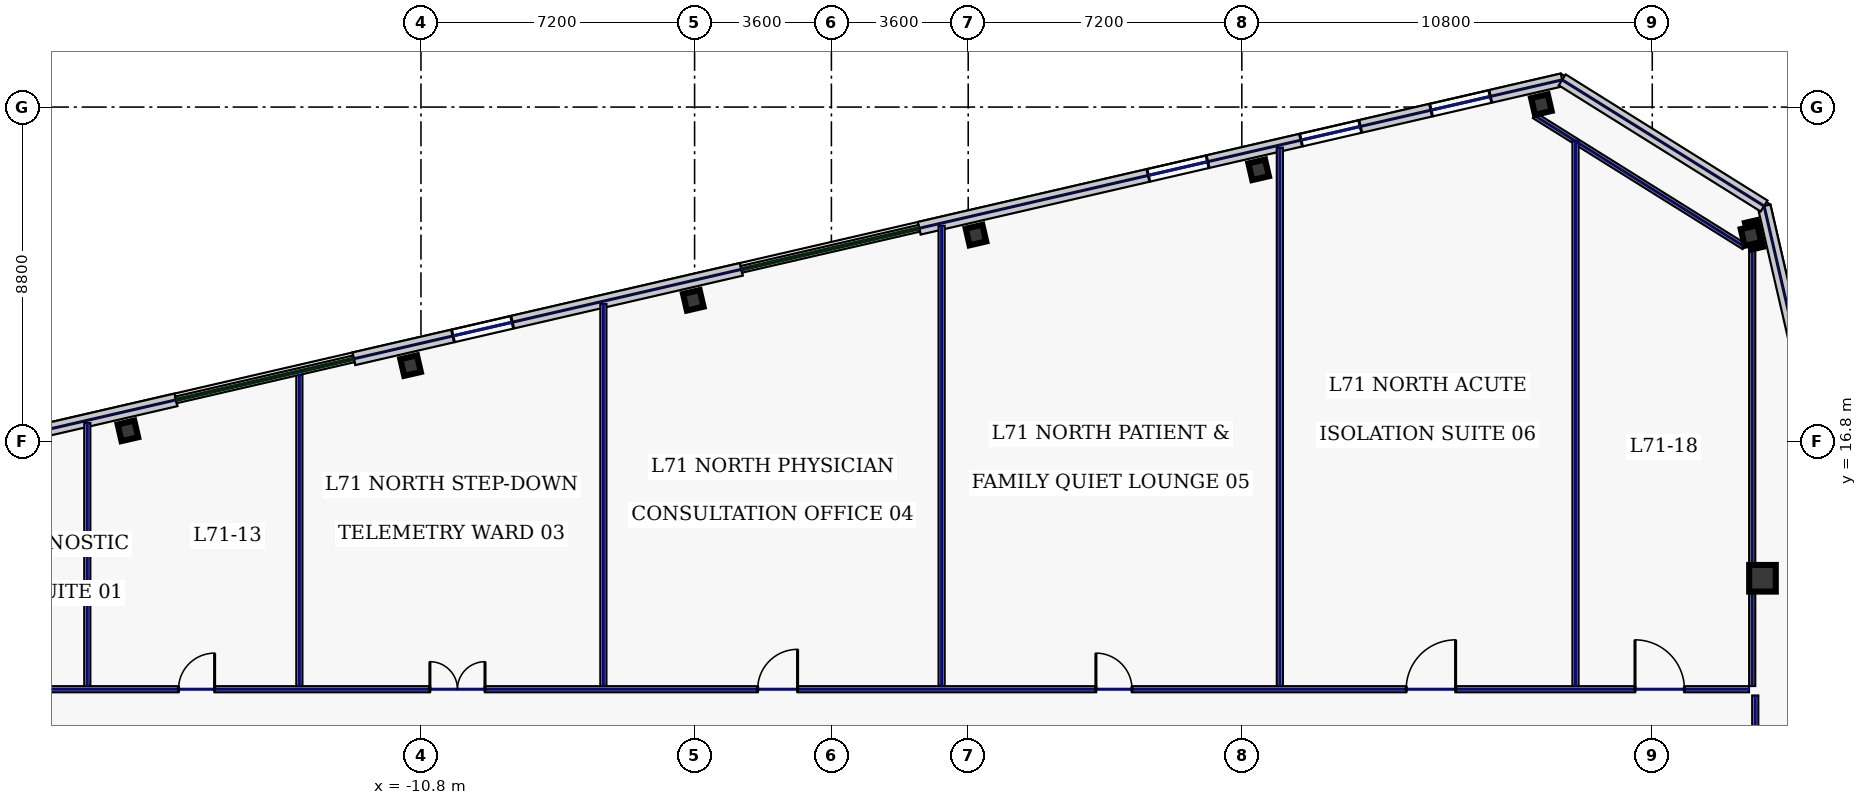
"""IFC4 building model, lengths in metres.
Left out: names, types, materials, properties, quantities, classifications, styles, units other than length and angle.
Written with IfcOpenShell. Run it as: python <this file> out.ifc"""

import sys

from ifc_helpers import new_model, si_unit, direction, frame, frame_2d, origin, origin_2d, place, context, subcontext, project, spatial, rectangle, hollow_rectangle, extrude, element, fill, save


model = new_model("IFC4")
c1 = context("Model", 3, precision=1e-05, world=origin(), true_north=direction((0.0, 1.0)))
c2 = subcontext(c1, "Body", "Model", "MODEL_VIEW")
j1 = project(units=[si_unit("LENGTHUNIT", "METRE"), si_unit("PLANEANGLEUNIT", "RADIAN")], contexts=[c1])
p1 = place(None, origin())
s1 = spatial("IfcSite", under=j1, at=p1, CompositionType="ELEMENT")
p2 = place(p1, origin())
s2 = spatial("IfcBuilding", under=s1, at=p2, CompositionType="ELEMENT")
p3 = place(p2, frame((0.0, 0.0, 305.0)))
s3 = spatial("IfcBuildingStorey", under=s2, at=p3, CompositionType="ELEMENT", Elevation=305.0)
p4 = place(p3, frame((24.5, 13.2, 0.0), z_axis=(0.0, 0.0, 1.0), x_axis=(1.0, 0.0, 0.0)))
e1 = element("IfcColumn", 1, at=p4, inside=s3, PredefinedType="COLUMN", context=c2, shape_type="SweptSolid", body=[
    extrude(hollow_rectangle(XDim=0.7, YDim=0.7, WallThickness=0.032, at=origin_2d()), origin(), (0.0, 0.0, 1.0), 3.74),
])
for number, where, z_axis, x_axis in (
    (2, (18.682, 25.666, 0.0), (0.0, 0.0, 1.0), (0.974, 0.225, 0.0)),
    (3, (11.243, 23.949, 0.0), (0.0, 0.0, 1.0), (0.974, 0.225, 0.0)),
    (4, (3.804, 22.232, 0.0), (0.0, 0.0, 1.0), (0.974, 0.225, 0.0)),
    (5, (-3.634, 20.514, 0.0), (0.0, 0.0, 1.0), (0.974, 0.225, 0.0)),
    (6, (-11.073, 18.797, 0.0), (0.0, 0.0, 1.0), (0.974, 0.225, 0.0)),
    (7, (-18.511, 17.08, 0.0), (0.0, 0.0, 1.0), (0.974, 0.225, 0.0)),
    (8, (24.198, 22.219, 0.0), (0.0, 0.0, 1.0), (0.974, 0.225, 0.0)),
):
    element("IfcColumn", number, at=place(p3, frame(where, z_axis=z_axis, x_axis=x_axis)), inside=s3, PredefinedType="COLUMN", context=c2, shape_type="SweptSolid", body=[
        extrude(hollow_rectangle(XDim=0.45, YDim=0.45, WallThickness=0.022, at=origin_2d()), origin(), (0.0, 0.0, 1.0), 3.74),
    ])
p5 = place(p3, frame((19.229, 26.316, 0.0), z_axis=(0.0, 0.0, 1.0), x_axis=(-0.974372473594, -0.224940620392, 0.0)))
e9 = element("IfcWall", 9, at=p5, inside=s3, PredefinedType="STANDARD", context=c2, shape_type="SweptSolid", body=[
    extrude(rectangle(XDim=17.366, YDim=0.34, at=frame_2d((8.683, 0.0))), origin(), (0.0, 0.0, 1.0), 3.74),
])
p6 = place(p5, frame((9.576, 0.0, 0.22)))
e10 = element("IfcOpeningElement", 10, at=p6, cuts=e9, PredefinedType="OPENING", context=c2, shape_type="SweptSolid", body=[
    extrude(rectangle(XDim=1.6, YDim=1.2, at=frame_2d((0.8, 0.6))), frame((0.0, 0.18, 0.0), z_axis=(0.0, -1.0, 0.0), x_axis=(1.0, 0.0, 0.0)), (0.0, 0.0, 1.0), 0.36),
])
p7 = place(p5, frame((5.453, 0.0, 0.22)))
e11 = element("IfcOpeningElement", 11, at=p7, cuts=e9, PredefinedType="OPENING", context=c2, shape_type="SweptSolid", body=[
    extrude(rectangle(XDim=1.6, YDim=1.2, at=frame_2d((0.8, 0.6))), frame((0.0, 0.18, 0.0), z_axis=(0.0, -1.0, 0.0), x_axis=(1.0, 0.0, 0.0)), (0.0, 0.0, 1.0), 0.36),
])
p8 = place(p5, frame((1.941, 0.0, 0.22)))
e12 = element("IfcOpeningElement", 12, at=p8, cuts=e9, PredefinedType="OPENING", context=c2, shape_type="SweptSolid", body=[
    extrude(rectangle(XDim=1.6, YDim=1.2, at=frame_2d((0.8, 0.6))), frame((0.0, 0.18, 0.0), z_axis=(0.0, -1.0, 0.0), x_axis=(1.0, 0.0, 0.0)), (0.0, 0.0, 1.0), 0.36),
])
p9 = place(p3, frame((-2.368, 21.33, 0.0), z_axis=(0.0, 0.0, 1.0), x_axis=(-0.974367213107, -0.224963405961, 0.0)))
e13 = element("IfcWall", 13, at=p9, inside=s3, PredefinedType="STANDARD", context=c2, shape_type="SweptSolid", body=[
    extrude(rectangle(XDim=10.468, YDim=0.34, at=frame_2d((5.234, 0.0))), origin(), (0.0, 0.0, 1.0), 3.74),
])
p10 = place(p9, frame((6.19, 0.0, 0.22)))
e14 = element("IfcOpeningElement", 14, at=p10, cuts=e13, PredefinedType="OPENING", context=c2, shape_type="SweptSolid", body=[
    extrude(rectangle(XDim=1.6, YDim=1.2, at=frame_2d((0.8, 0.6))), frame((0.0, 0.18, 0.0), z_axis=(0.0, -1.0, 0.0), x_axis=(1.0, 0.0, 0.0)), (0.0, 0.0, 1.0), 0.36),
])
p11 = place(p3, frame((-17.245, 17.895, 0.0), z_axis=(0.0, 0.0, 1.0), x_axis=(-0.97437318493, -0.224937539085, 0.0)))
e15 = element("IfcWall", 15, at=p11, inside=s3, PredefinedType="STANDARD", context=c2, shape_type="SweptSolid", body=[
    extrude(rectangle(XDim=17.366, YDim=0.34, at=frame_2d((8.683, 0.0))), origin(), (0.0, 0.0, 1.0), 3.74),
])
p12 = place(p11, frame((13.825, 0.0, 0.22)))
e16 = element("IfcOpeningElement", 16, at=p12, cuts=e15, PredefinedType="OPENING", context=c2, shape_type="SweptSolid", body=[
    extrude(rectangle(XDim=1.6, YDim=1.2, at=frame_2d((0.8, 0.6))), frame((0.0, 0.18, 0.0), z_axis=(0.0, -1.0, 0.0), x_axis=(1.0, 0.0, 0.0)), (0.0, 0.0, 1.0), 0.36),
])
p13 = place(p11, frame((10.313, 0.0, 0.22)))
e17 = element("IfcOpeningElement", 17, at=p13, cuts=e15, PredefinedType="OPENING", context=c2, shape_type="SweptSolid", body=[
    extrude(rectangle(XDim=1.6, YDim=1.2, at=frame_2d((0.8, 0.6))), frame((0.0, 0.18, 0.0), z_axis=(0.0, -1.0, 0.0), x_axis=(1.0, 0.0, 0.0)), (0.0, 0.0, 1.0), 0.36),
])
p14 = place(p3, frame((32.686, -12.276, 0.0), z_axis=(0.0, 0.0, 1.0), x_axis=(-0.224953091034, 0.974369594576, 0.0)))
e18 = element("IfcWall", 18, at=p14, inside=s3, PredefinedType="STANDARD", context=c2, shape_type="SweptSolid", body=[
    extrude(rectangle(XDim=36.2, YDim=0.34, at=frame_2d((18.1, 0.0))), origin(), (0.0, 0.0, 1.0), 3.74),
])
p15 = place(p14, frame((3.725, 0.0, 0.22)))
e19 = element("IfcOpeningElement", 19, at=p15, cuts=e18, PredefinedType="OPENING", context=c2, shape_type="SweptSolid", body=[
    extrude(rectangle(XDim=1.6, YDim=1.2, at=frame_2d((0.8, 0.6))), frame((0.0, 0.18, 0.0), z_axis=(0.0, -1.0, 0.0), x_axis=(1.0, 0.0, 0.0)), (0.0, 0.0, 1.0), 0.36),
])
p16 = place(p14, frame((21.825, 0.0, 0.22)))
e20 = element("IfcOpeningElement", 20, at=p16, cuts=e18, PredefinedType="OPENING", context=c2, shape_type="SweptSolid", body=[
    extrude(rectangle(XDim=1.6, YDim=1.2, at=frame_2d((0.8, 0.6))), frame((0.0, 0.18, 0.0), z_axis=(0.0, -1.0, 0.0), x_axis=(1.0, 0.0, 0.0)), (0.0, 0.0, 1.0), 0.36),
])
p17 = place(p14, frame((30.875, 0.0, 0.22)))
e21 = element("IfcOpeningElement", 21, at=p17, cuts=e18, PredefinedType="OPENING", context=c2, shape_type="SweptSolid", body=[
    extrude(rectangle(XDim=1.6, YDim=1.2, at=frame_2d((0.8, 0.6))), frame((0.0, 0.18, 0.0), z_axis=(0.0, -1.0, 0.0), x_axis=(1.0, 0.0, 0.0)), (0.0, 0.0, 1.0), 0.36),
])
p18 = place(p3, frame((24.542, 22.996, 0.0), z_axis=(0.0, 0.0, 1.0), x_axis=(-0.848055220921, 0.529907862057, 0.0)))
e22 = element("IfcWall", 22, at=p18, inside=s3, PredefinedType="STANDARD", context=c2, shape_type="SweptSolid", body=[
    extrude(rectangle(XDim=6.265, YDim=0.34, at=frame_2d((3.132, 0.0))), origin(), (0.0, 0.0, 1.0), 3.74),
])
p19 = place(p3, frame((24.018, 21.931, 0.0), z_axis=(0.0, 0.0, 1.0), x_axis=(-0.848051009591, 0.529914601736, 0.0)))
e23 = element("IfcWall", 23, at=p19, inside=s3, PredefinedType="PARTITIONING", context=c2, shape_type="SweptSolid", body=[
    extrude(rectangle(XDim=6.505, YDim=0.16, at=frame_2d((3.253, 0.0))), origin(), (0.0, 0.0, 1.0), 1.535),
])
p20 = place(p3, frame((-24.145, 10.28, 0.0), z_axis=(0.0, 0.0, 1.0), x_axis=(1.0, 0.0, 0.0)))
e24 = element("IfcWall", 24, at=p20, inside=s3, PredefinedType="PARTITIONING", context=c2, shape_type="SweptSolid", body=[
    extrude(rectangle(XDim=48.29, YDim=0.16, at=frame_2d((24.145, 0.0))), origin(), (0.0, 0.0, 1.0), 3.74),
])
p21 = place(p20, frame((2.044, 0.0, 0.0)))
e25 = element("IfcOpeningElement", 25, at=p21, cuts=e24, PredefinedType="OPENING", context=c2, shape_type="SweptSolid", body=[
    extrude(rectangle(XDim=0.95, YDim=2.2, at=frame_2d((0.475, 1.1))), frame((0.0, 0.09, 0.0), z_axis=(0.0, -1.0, 0.0), x_axis=(1.0, 0.0, 0.0)), (0.0, 0.0, 1.0), 0.18),
])
p22 = place(p20, frame((6.965, 0.0, 0.0)))
e26 = element("IfcOpeningElement", 26, at=p22, cuts=e24, PredefinedType="OPENING", context=c2, shape_type="SweptSolid", body=[
    extrude(rectangle(XDim=0.95, YDim=2.2, at=frame_2d((0.475, 1.1))), frame((0.0, 0.09, 0.0), z_axis=(0.0, -1.0, 0.0), x_axis=(1.0, 0.0, 0.0)), (0.0, 0.0, 1.0), 0.18),
])
p23 = place(p20, frame((13.58, 0.0, 0.0)))
e27 = element("IfcOpeningElement", 27, at=p23, cuts=e24, PredefinedType="OPENING", context=c2, shape_type="SweptSolid", body=[
    extrude(rectangle(XDim=1.45, YDim=2.2, at=frame_2d((0.725, 1.1))), frame((0.0, 0.09, 0.0), z_axis=(0.0, -1.0, 0.0), x_axis=(1.0, 0.0, 0.0)), (0.0, 0.0, 1.0), 0.18),
])
p24 = place(p20, frame((22.205, 0.0, 0.0)))
e28 = element("IfcOpeningElement", 28, at=p24, cuts=e24, PredefinedType="OPENING", context=c2, shape_type="SweptSolid", body=[
    extrude(rectangle(XDim=1.05, YDim=2.2, at=frame_2d((0.525, 1.1))), frame((0.0, 0.09, 0.0), z_axis=(0.0, -1.0, 0.0), x_axis=(1.0, 0.0, 0.0)), (0.0, 0.0, 1.0), 0.18),
])
p25 = place(p20, frame((31.105, 0.0, 0.0)))
e29 = element("IfcOpeningElement", 29, at=p25, cuts=e24, PredefinedType="OPENING", context=c2, shape_type="SweptSolid", body=[
    extrude(rectangle(XDim=0.95, YDim=2.2, at=frame_2d((0.475, 1.1))), frame((0.0, 0.09, 0.0), z_axis=(0.0, -1.0, 0.0), x_axis=(1.0, 0.0, 0.0)), (0.0, 0.0, 1.0), 0.18),
])
p26 = place(p20, frame((39.27, 0.0, 0.0)))
e30 = element("IfcOpeningElement", 30, at=p26, cuts=e24, PredefinedType="OPENING", context=c2, shape_type="SweptSolid", body=[
    extrude(rectangle(XDim=1.3, YDim=2.2, at=frame_2d((0.65, 1.1))), frame((0.0, 0.09, 0.0), z_axis=(0.0, -1.0, 0.0), x_axis=(1.0, 0.0, 0.0)), (0.0, 0.0, 1.0), 0.18),
])
p27 = place(p20, frame((45.291, 0.0, 0.0)))
e31 = element("IfcOpeningElement", 31, at=p27, cuts=e24, PredefinedType="OPENING", context=c2, shape_type="SweptSolid", body=[
    extrude(rectangle(XDim=1.3, YDim=2.2, at=frame_2d((0.65, 1.1))), frame((0.0, 0.09, 0.0), z_axis=(0.0, -1.0, 0.0), x_axis=(1.0, 0.0, 0.0)), (0.0, 0.0, 1.0), 0.18),
])
p28 = place(p3, frame((24.31, 10.115, 0.0), z_axis=(0.0, 0.0, 1.0), x_axis=(0.0, -1.0, 0.0)))
e32 = element("IfcWall", 32, at=p28, inside=s3, PredefinedType="PARTITIONING", context=c2, shape_type="SweptSolid", body=[
    extrude(rectangle(XDim=20.13, YDim=0.16, at=frame_2d((10.065, 0.0))), origin(), (0.0, 0.0, 1.0), 3.74),
])
p29 = place(p28, frame((14.581, 0.0, 0.0)))
e33 = element("IfcOpeningElement", 33, at=p29, cuts=e32, PredefinedType="OPENING", context=c2, shape_type="SweptSolid", body=[
    extrude(rectangle(XDim=0.95, YDim=2.2, at=frame_2d((0.475, 1.1))), frame((0.0, 0.09, 0.0), z_axis=(0.0, -1.0, 0.0), x_axis=(1.0, 0.0, 0.0)), (0.0, 0.0, 1.0), 0.18),
])
p30 = place(p28, frame((4.819, 0.0, 0.0)))
e34 = element("IfcOpeningElement", 34, at=p30, cuts=e32, PredefinedType="OPENING", context=c2, shape_type="SweptSolid", body=[
    extrude(rectangle(XDim=0.95, YDim=2.2, at=frame_2d((0.475, 1.1))), frame((0.0, 0.09, 0.0), z_axis=(0.0, -1.0, 0.0), x_axis=(1.0, 0.0, 0.0)), (0.0, 0.0, 1.0), 0.18),
])
p31 = place(p3, frame((24.23, 10.365, 0.0), z_axis=(0.0, 0.0, 1.0), x_axis=(0.0, 1.0, 0.0)))
e35 = element("IfcWall", 35, at=p31, inside=s3, PredefinedType="PARTITIONING", context=c2, shape_type="SweptSolid", body=[
    extrude(rectangle(XDim=12.206, YDim=0.16, at=frame_2d((6.103, 0.0))), origin(), (0.0, 0.0, 1.0), 1.535),
])
p32 = place(p3, frame((-19.58, 10.365, 0.0), z_axis=(0.0, 0.0, 1.0), x_axis=(0.0, 1.0, 0.0)))
e36 = element("IfcWall", 36, at=p32, inside=s3, PredefinedType="PARTITIONING", context=c2, shape_type="SweptSolid", body=[
    extrude(rectangle(XDim=6.919, YDim=0.16, at=frame_2d((3.46, 0.0))), origin(), (0.0, 0.0, 1.0), 3.74),
])
p33 = place(p3, frame((-14.0, 10.365, 0.0), z_axis=(0.0, 0.0, 1.0), x_axis=(0.0, 1.0, 0.0)))
e37 = element("IfcWall", 37, at=p33, inside=s3, PredefinedType="PARTITIONING", context=c2, shape_type="SweptSolid", body=[
    extrude(rectangle(XDim=8.208, YDim=0.16, at=frame_2d((4.104, 0.0))), origin(), (0.0, 0.0, 1.0), 3.74),
])
p34 = place(p3, frame((-6.0, 10.365, 0.0), z_axis=(0.0, 0.0, 1.0), x_axis=(0.0, 1.0, 0.0)))
e38 = element("IfcWall", 38, at=p34, inside=s3, PredefinedType="PARTITIONING", context=c2, shape_type="SweptSolid", body=[
    extrude(rectangle(XDim=10.055, YDim=0.16, at=frame_2d((5.027, 0.0))), origin(), (0.0, 0.0, 1.0), 3.74),
])
p35 = place(p3, frame((2.9, 10.365, 0.0), z_axis=(0.0, 0.0, 1.0), x_axis=(0.0, 1.0, 0.0)))
e39 = element("IfcWall", 39, at=p35, inside=s3, PredefinedType="PARTITIONING", context=c2, shape_type="SweptSolid", body=[
    extrude(rectangle(XDim=12.109, YDim=0.16, at=frame_2d((6.055, 0.0))), origin(), (0.0, 0.0, 1.0), 3.74),
])
p36 = place(p3, frame((11.8, 10.365, 0.0), z_axis=(0.0, 0.0, 1.0), x_axis=(0.0, 1.0, 0.0)))
e40 = element("IfcWall", 40, at=p36, inside=s3, PredefinedType="PARTITIONING", context=c2, shape_type="SweptSolid", body=[
    extrude(rectangle(XDim=14.164, YDim=0.16, at=frame_2d((7.082, 0.0))), origin(), (0.0, 0.0, 1.0), 3.74),
])
p37 = place(p3, frame((19.58, 10.365, 0.0), z_axis=(0.0, 0.0, 1.0), x_axis=(0.0, 1.0, 0.0)))
e41 = element("IfcWall", 41, at=p37, inside=s3, PredefinedType="PARTITIONING", context=c2, shape_type="SweptSolid", body=[
    extrude(rectangle(XDim=14.348, YDim=0.16, at=frame_2d((7.174, 0.0))), origin(), (0.0, 0.0, 1.0), 3.74),
])
p38 = place(p6, origin())
e42 = element("IfcWindow", 42, at=p38, inside=s3, PartitioningType="SINGLE_PANEL", PredefinedType="WINDOW", context=c2, shape_type="SweptSolid", body=[
    extrude(rectangle(XDim=1.6, YDim=1.2, at=frame_2d((0.8, 0.6))), frame((0.0, 0.03, 0.0), z_axis=(0.0, -1.0, 0.0), x_axis=(1.0, 0.0, 0.0)), (0.0, 0.0, 1.0), 0.06),
])
fill(e10, e42)
p39 = place(p7, origin())
e43 = element("IfcWindow", 43, at=p39, inside=s3, PartitioningType="SINGLE_PANEL", PredefinedType="WINDOW", context=c2, shape_type="SweptSolid", body=[
    extrude(rectangle(XDim=1.6, YDim=1.2, at=frame_2d((0.8, 0.6))), frame((0.0, 0.03, 0.0), z_axis=(0.0, -1.0, 0.0), x_axis=(1.0, 0.0, 0.0)), (0.0, 0.0, 1.0), 0.06),
])
fill(e11, e43)
p40 = place(p8, origin())
e44 = element("IfcWindow", 44, at=p40, inside=s3, PartitioningType="SINGLE_PANEL", PredefinedType="WINDOW", context=c2, shape_type="SweptSolid", body=[
    extrude(rectangle(XDim=1.6, YDim=1.2, at=frame_2d((0.8, 0.6))), frame((0.0, 0.03, 0.0), z_axis=(0.0, -1.0, 0.0), x_axis=(1.0, 0.0, 0.0)), (0.0, 0.0, 1.0), 0.06),
])
fill(e12, e44)
p41 = place(p10, origin())
e45 = element("IfcWindow", 45, at=p41, inside=s3, PartitioningType="SINGLE_PANEL", PredefinedType="WINDOW", context=c2, shape_type="SweptSolid", body=[
    extrude(rectangle(XDim=1.6, YDim=1.2, at=frame_2d((0.8, 0.6))), frame((0.0, 0.03, 0.0), z_axis=(0.0, -1.0, 0.0), x_axis=(1.0, 0.0, 0.0)), (0.0, 0.0, 1.0), 0.06),
])
fill(e14, e45)
p42 = place(p22, origin())
e46 = element("IfcDoor", 46, at=p42, inside=s3, OperationType="SINGLE_SWING_RIGHT", PredefinedType="DOOR", context=c2, shape_type="SweptSolid", body=[
    extrude(rectangle(XDim=0.95, YDim=2.2, at=frame_2d((0.475, 1.1))), frame((0.0, 0.025, 0.0), z_axis=(0.0, -1.0, 0.0), x_axis=(1.0, 0.0, 0.0)), (0.0, 0.0, 1.0), 0.05),
])
fill(e26, e46)
p43 = place(p23, origin())
e47 = element("IfcDoor", 47, at=p43, inside=s3, OperationType="DOUBLE_SWING_LEFT", PredefinedType="DOOR", context=c2, shape_type="SweptSolid", body=[
    extrude(rectangle(XDim=1.45, YDim=2.2, at=frame_2d((0.725, 1.1))), frame((0.0, 0.025, 0.0), z_axis=(0.0, -1.0, 0.0), x_axis=(1.0, 0.0, 0.0)), (0.0, 0.0, 1.0), 0.05),
])
fill(e27, e47)
p44 = place(p24, origin())
e48 = element("IfcDoor", 48, at=p44, inside=s3, OperationType="SINGLE_SWING_RIGHT", PredefinedType="DOOR", context=c2, shape_type="SweptSolid", body=[
    extrude(rectangle(XDim=1.05, YDim=2.2, at=frame_2d((0.525, 1.1))), frame((0.0, 0.025, 0.0), z_axis=(0.0, -1.0, 0.0), x_axis=(1.0, 0.0, 0.0)), (0.0, 0.0, 1.0), 0.05),
])
fill(e28, e48)
p45 = place(p25, origin())
e49 = element("IfcDoor", 49, at=p45, inside=s3, OperationType="SINGLE_SWING_LEFT", PredefinedType="DOOR", context=c2, shape_type="SweptSolid", body=[
    extrude(rectangle(XDim=0.95, YDim=2.2, at=frame_2d((0.475, 1.1))), frame((0.0, 0.025, 0.0), z_axis=(0.0, -1.0, 0.0), x_axis=(1.0, 0.0, 0.0)), (0.0, 0.0, 1.0), 0.05),
])
fill(e29, e49)
p46 = place(p26, origin())
e50 = element("IfcDoor", 50, at=p46, inside=s3, OperationType="SINGLE_SWING_RIGHT", PredefinedType="DOOR", context=c2, shape_type="SweptSolid", body=[
    extrude(rectangle(XDim=1.3, YDim=2.2, at=frame_2d((0.65, 1.1))), frame((0.0, 0.025, 0.0), z_axis=(0.0, -1.0, 0.0), x_axis=(1.0, 0.0, 0.0)), (0.0, 0.0, 1.0), 0.05),
])
fill(e30, e50)
p47 = place(p27, origin())
e51 = element("IfcDoor", 51, at=p47, inside=s3, OperationType="SINGLE_SWING_LEFT", PredefinedType="DOOR", context=c2, shape_type="SweptSolid", body=[
    extrude(rectangle(XDim=1.3, YDim=2.2, at=frame_2d((0.65, 1.1))), frame((0.0, 0.025, 0.0), z_axis=(0.0, -1.0, 0.0), x_axis=(1.0, 0.0, 0.0)), (0.0, 0.0, 1.0), 0.05),
])
fill(e31, e51)
save(model, sys.argv[1])
